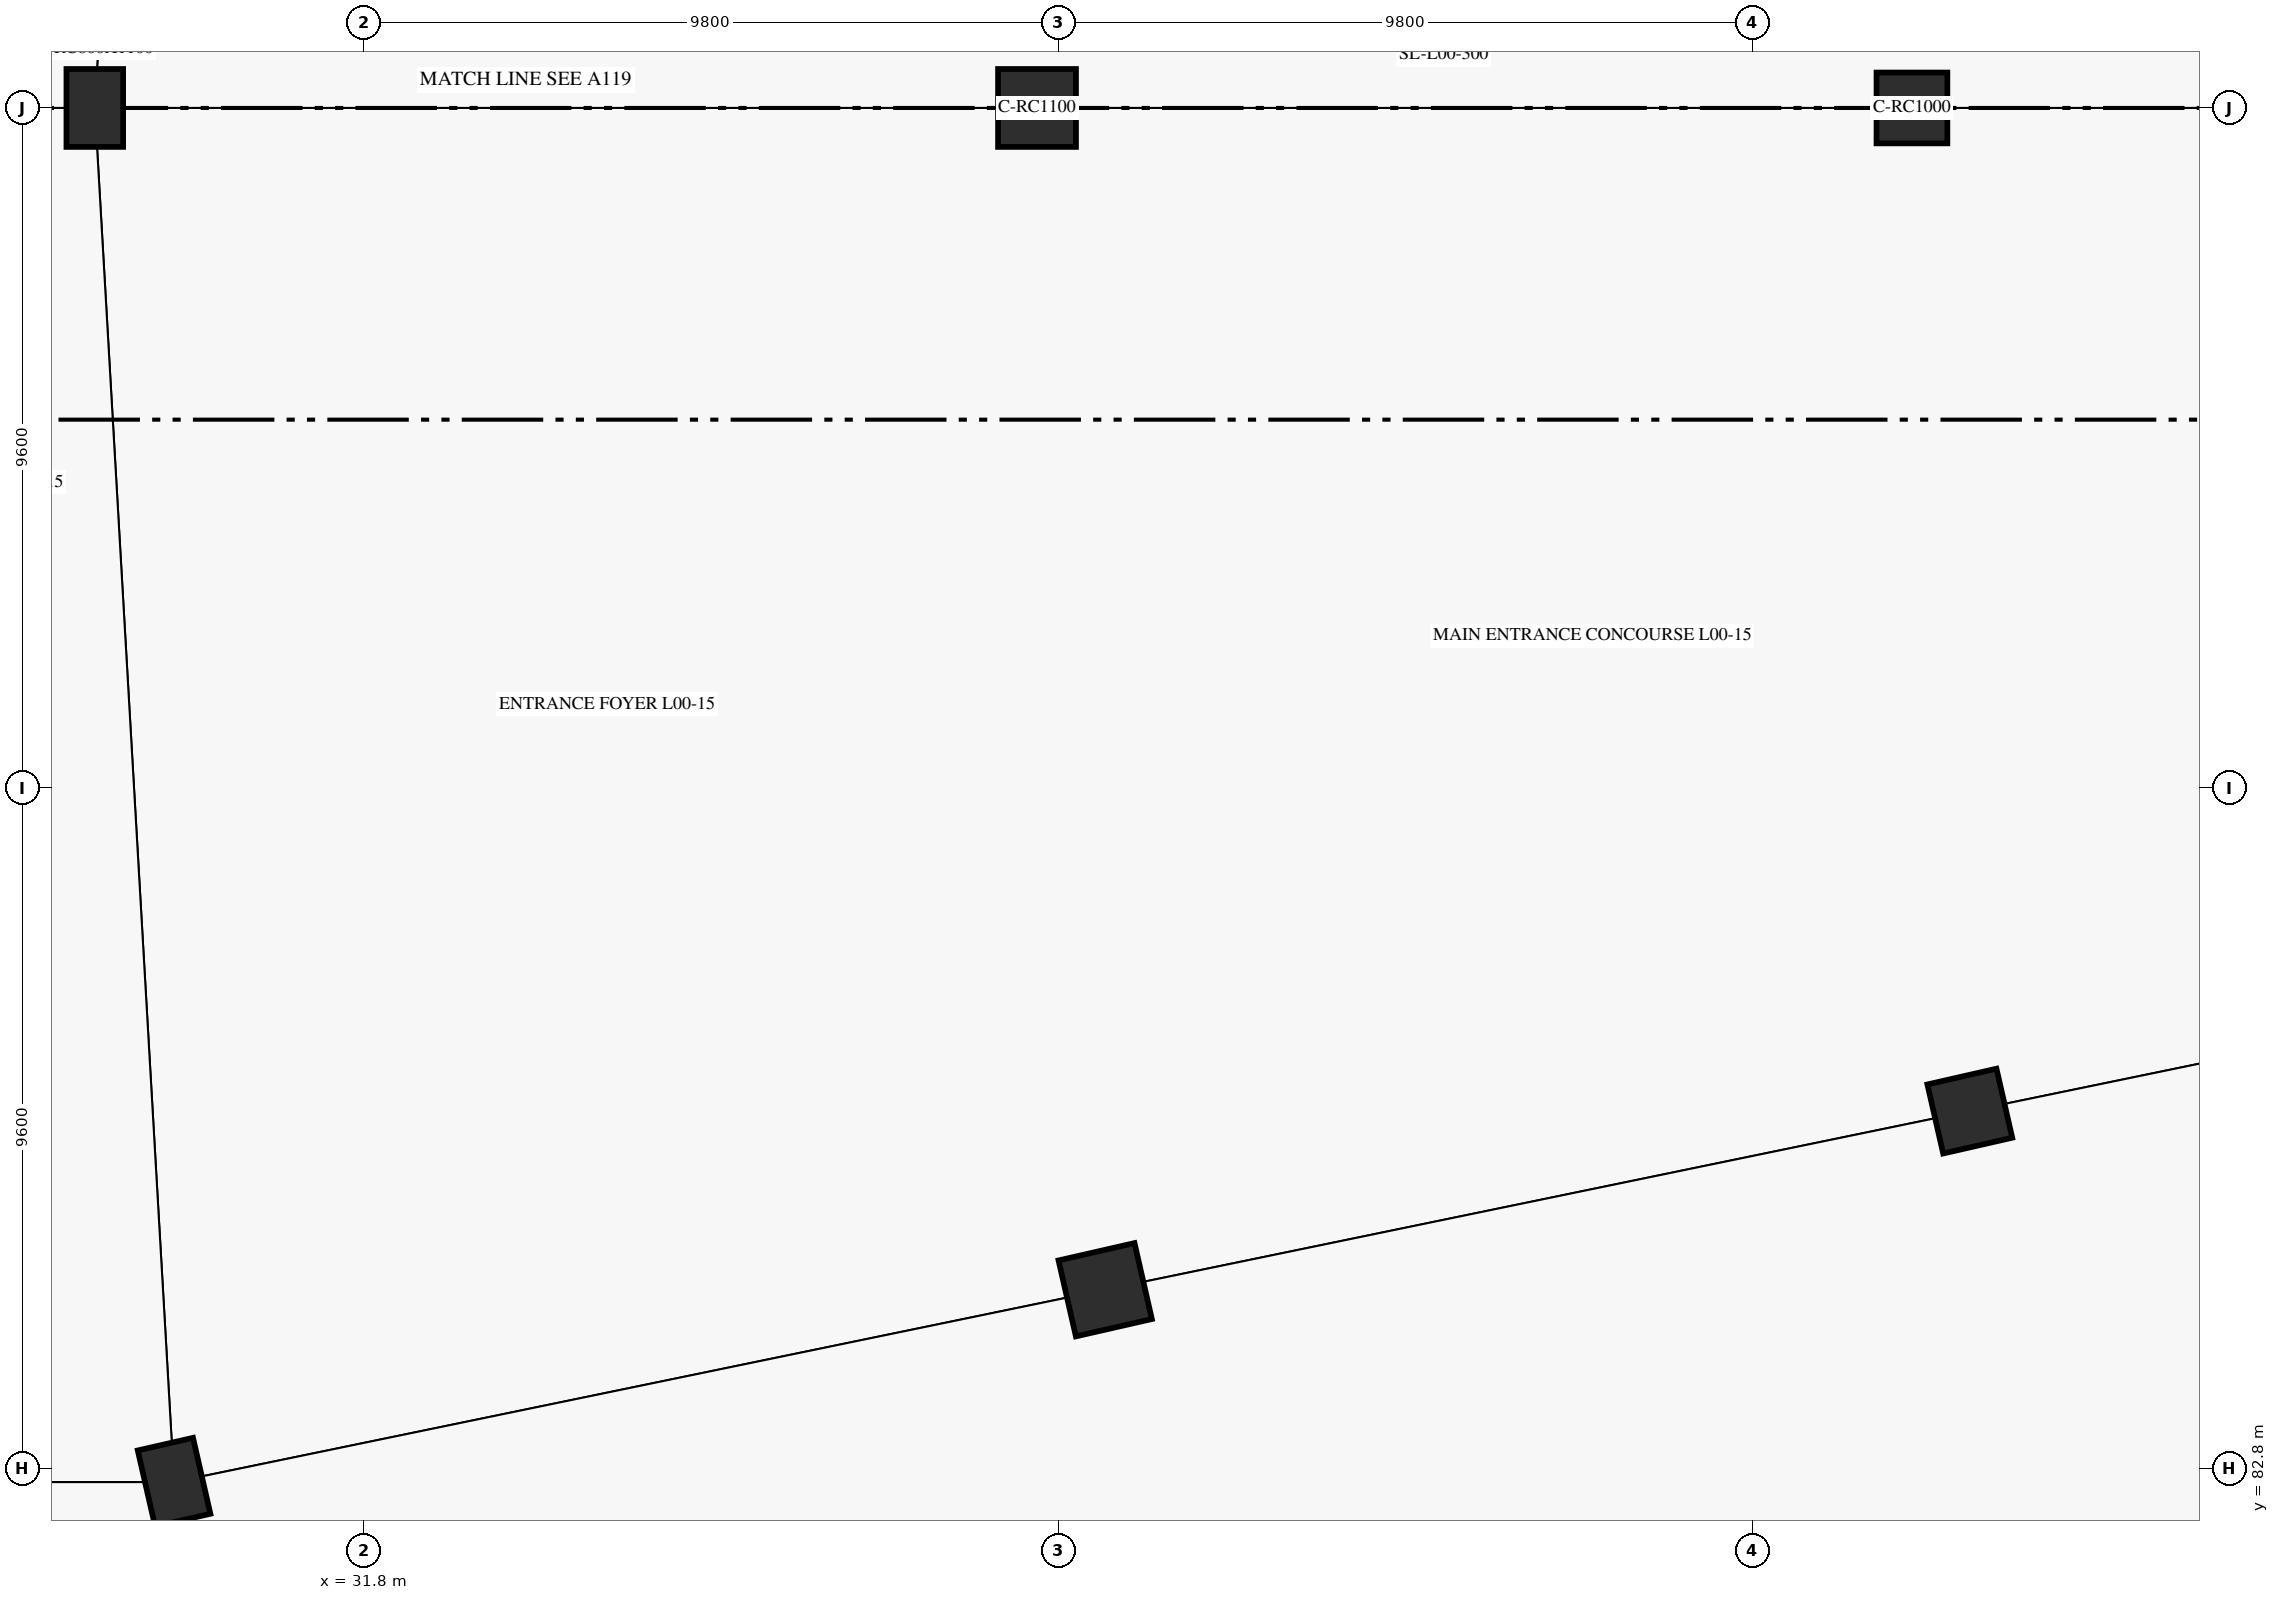
"""IFC4 building model, lengths in metres.
Left out: names, types, materials, properties, quantities, classifications, styles, units other than length and angle.
Written with IfcOpenShell. Run it as: python <this file> out.ifc"""

import sys

from ifc_helpers import new_model, si_unit, direction, frame, frame_2d, origin, origin_2d, place, context, subcontext, project, spatial, rectangle, extrude, element, save


model = new_model("IFC4")
c1 = context("Model", 3, precision=1e-05, world=origin(), true_north=direction((0.0, 1.0)))
c2 = subcontext(c1, "Body", "Model", "MODEL_VIEW")
j1 = project(units=[si_unit("LENGTHUNIT", "METRE"), si_unit("PLANEANGLEUNIT", "RADIAN")], contexts=[c1])
p1 = place(None, origin())
s1 = spatial("IfcSite", under=j1, at=p1, CompositionType="ELEMENT")
p2 = place(p1, origin())
s2 = spatial("IfcBuilding", under=s1, at=p2, CompositionType="ELEMENT")
p3 = place(p2, origin())
s3 = spatial("IfcBuildingStorey", under=s2, at=p3, CompositionType="ELEMENT", Elevation=0.0)
for number, where, z_axis, x_axis in (
    (1, (53.65, 102.0, 0.0), (0.0, 0.0, 1.0), (-1.0, 0.0, 0.0)),
    (2, (54.467, 87.84, 0.0), (0.0, 0.0, 1.0), (-0.975, -0.223, 0.0)),
):
    element("IfcColumn", number, at=place(p3, frame(where, z_axis=z_axis, x_axis=x_axis)), inside=s3, PredefinedType="COLUMN", context=c2, shape_type="SweptSolid", body=[
        extrude(rectangle(XDim=1.0, YDim=1.0, at=origin_2d()), origin(), (0.0, 0.0, 1.0), 5.78),
    ])
for number, where, z_axis, x_axis in (
    (3, (41.3, 102.0, 0.0), (0.0, 0.0, 1.0), (-1.0, 0.0, 0.0)),
    (4, (42.262, 85.318, 0.0), (0.0, 0.0, 1.0), (-0.975, -0.223, 0.0)),
):
    element("IfcColumn", number, at=place(p3, frame(where, z_axis=z_axis, x_axis=x_axis)), inside=s3, PredefinedType="COLUMN", context=c2, shape_type="SweptSolid", body=[
        extrude(rectangle(XDim=1.1, YDim=1.1, at=origin_2d()), origin(), (0.0, 0.0, 1.0), 5.78),
    ])
for number, where, z_axis, x_axis in (
    (5, (28.0, 102.0, 0.0), (0.0, 0.0, 1.0), (-1.0, 0.0, 0.0)),
    (6, (29.119, 82.602, 0.0), (0.0, 0.0, 1.0), (-0.975, -0.223, 0.0)),
):
    element("IfcColumn", number, at=place(p3, frame(where, z_axis=z_axis, x_axis=x_axis)), inside=s3, PredefinedType="COLUMN", context=c2, shape_type="SweptSolid", body=[
        extrude(rectangle(XDim=0.8, YDim=1.1, at=origin_2d()), origin(), (0.0, 0.0, 1.0), 5.78),
    ])
p4 = place(p3, frame((23.214, 82.234, 0.0), z_axis=(0.0, 0.0, 1.0), x_axis=(0.249965196191, -0.968254822189, 0.0)))
e7 = element("IfcWall", 7, at=p4, inside=s3, PredefinedType="SOLIDWALL", context=c2, shape_type="SweptSolid", body=[
    extrude(rectangle(XDim=19.226, YDim=0.3, at=frame_2d((9.613, 0.0))), origin(), (0.0, 0.0, 1.0), 4.8),
])
p5 = place(p4, frame((7.913, 0.0, 0.0)))
e8 = element("IfcOpeningElement", 8, at=p5, cuts=e7, PredefinedType="OPENING", context=c2, shape_type="SweptSolid", body=[
    extrude(rectangle(XDim=3.4, YDim=2.6, at=frame_2d((1.7, 1.3))), frame((0.0, 0.16, 0.0), z_axis=(0.0, -1.0, 0.0), x_axis=(1.0, 0.0, 0.0)), (0.0, 0.0, 1.0), 0.32),
])
p6 = place(p4, frame((4.613, 0.0, 1.1)))
e9 = element("IfcOpeningElement", 9, at=p6, cuts=e7, PredefinedType="OPENING", context=c2, shape_type="SweptSolid", body=[
    extrude(rectangle(XDim=2.4, YDim=1.8, at=frame_2d((1.2, 0.9))), frame((0.0, 0.16, 0.0), z_axis=(0.0, -1.0, 0.0), x_axis=(1.0, 0.0, 0.0)), (0.0, 0.0, 1.0), 0.32),
])
save(model, sys.argv[1])
